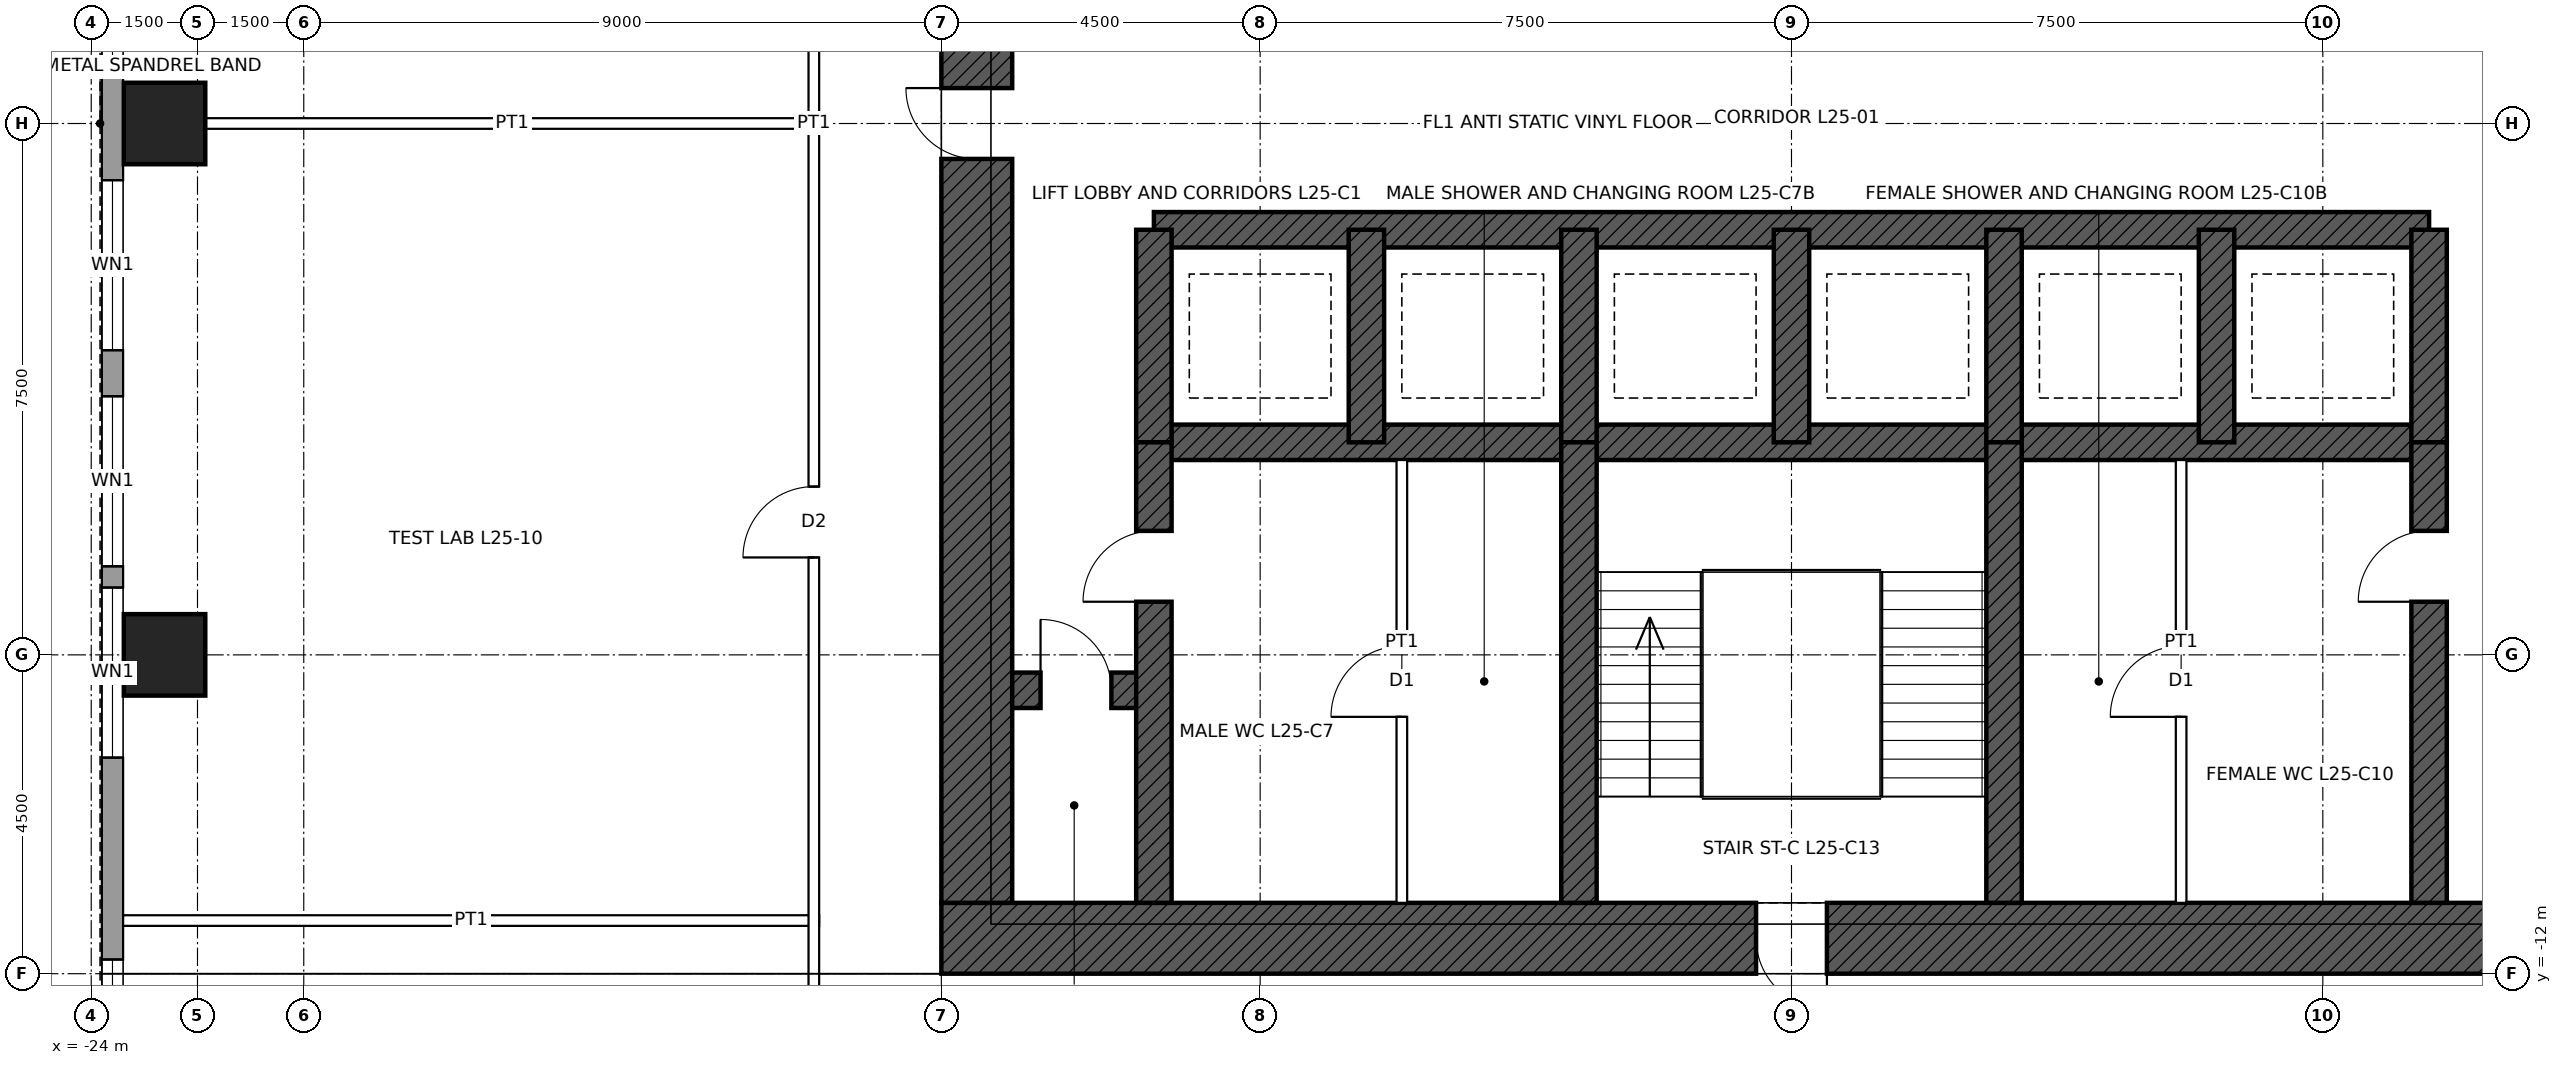
"""IFC4 building model, lengths in metres.
Left out: names, types, materials, properties, quantities, classifications, styles, units other than length and angle.
Written with IfcOpenShell. Run it as: python <this file> out.ifc"""

import sys

from ifc_helpers import new_model, si_unit, direction, frame, frame_2d, origin, origin_2d, place, context, subcontext, project, spatial, rectangle, hollow_rectangle, extrude, element, fill, save


model = new_model("IFC4")
c1 = context("Model", 3, precision=1e-05, world=origin(), true_north=direction((0.0, 1.0)))
c2 = subcontext(c1, "Body", "Model", "MODEL_VIEW")
j1 = project(units=[si_unit("LENGTHUNIT", "METRE"), si_unit("PLANEANGLEUNIT", "RADIAN")], contexts=[c1])
p1 = place(None, origin())
s1 = spatial("IfcSite", under=j1, at=p1, CompositionType="ELEMENT")
p2 = place(p1, origin())
s2 = spatial("IfcBuilding", under=s1, at=p2, CompositionType="ELEMENT")
p3 = place(p2, frame((0.0, 0.0, 126.9)))
s3 = spatial("IfcBuildingStorey", under=s2, at=p3, CompositionType="ELEMENT", Elevation=126.9)
for number, where, z_axis, x_axis in (
    (1, (-22.965, -7.5, 0.0), (0.0, 0.0, 1.0), (1.0, 0.0, 0.0)),
    (2, (-22.965, 0.0, 0.0), (0.0, 0.0, 1.0), (1.0, 0.0, 0.0)),
):
    element("IfcColumn", number, at=place(p3, frame(where, z_axis=z_axis, x_axis=x_axis)), inside=s3, PredefinedType="COLUMN", context=c2, shape_type="SweptSolid", body=[
        extrude(hollow_rectangle(XDim=1.15, YDim=1.15, WallThickness=0.075, at=origin_2d()), origin(), (0.0, 0.0, 1.0), 4.5),
    ])
p4 = place(p3, frame((12.0, -11.5, 0.0), z_axis=(0.0, 0.0, 1.0), x_axis=(-1.0, 0.0, 0.0)))
e3 = element("IfcWall", 3, at=p4, inside=s3, PredefinedType="SHEAR", context=c2, shape_type="SweptSolid", body=[
    extrude(rectangle(XDim=24.0, YDim=1.0, at=frame_2d((12.0, 0.0))), origin(), (0.0, 0.0, 1.0), 4.5),
])
p5 = place(p4, frame((11.5, 0.0, 0.0)))
e4 = element("IfcOpeningElement", 4, at=p5, cuts=e3, PredefinedType="OPENING", context=c2, shape_type="SweptSolid", body=[
    extrude(rectangle(XDim=1.0, YDim=2.1, at=frame_2d((0.5, 1.05))), frame((0.0, 0.51, 0.0), z_axis=(0.0, -1.0, 0.0), x_axis=(1.0, 0.0, 0.0)), (0.0, 0.0, 1.0), 1.02),
])
p6 = place(p4, frame((1.0, 0.0, 0.0)))
e5 = element("IfcOpeningElement", 5, at=p6, cuts=e3, PredefinedType="OPENING", context=c2, shape_type="SweptSolid", body=[
    extrude(rectangle(XDim=1.0, YDim=2.4, at=frame_2d((0.5, 1.2))), frame((0.0, 0.51, 0.0), z_axis=(0.0, -1.0, 0.0), x_axis=(1.0, 0.0, 0.0)), (0.0, 0.0, 1.0), 1.02),
])
p7 = place(p3, frame((-11.5, -11.0, 0.0), z_axis=(0.0, 0.0, 1.0), x_axis=(0.0, 1.0, 0.0)))
e6 = element("IfcWall", 6, at=p7, inside=s3, PredefinedType="SHEAR", context=c2, shape_type="SweptSolid", body=[
    extrude(rectangle(XDim=22.0, YDim=1.0, at=frame_2d((11.0, 0.0))), origin(), (0.0, 0.0, 1.0), 4.5),
])
p8 = place(p7, frame((10.5, 0.0, 0.0)))
e7 = element("IfcOpeningElement", 7, at=p8, cuts=e6, PredefinedType="OPENING", context=c2, shape_type="SweptSolid", body=[
    extrude(rectangle(XDim=1.0, YDim=2.4, at=frame_2d((0.5, 1.2))), frame((0.0, 0.51, 0.0), z_axis=(0.0, -1.0, 0.0), x_axis=(1.0, 0.0, 0.0)), (0.0, 0.0, 1.0), 1.02),
])
for number, where, z_axis, x_axis in (
    (8, (-9.0, -1.5, 0.0), (0.0, 0.0, 1.0), (1.0, 0.0, 0.0)),
    (9, (-9.0, -4.5, 0.0), (0.0, 0.0, 1.0), (1.0, 0.0, 0.0)),
):
    element("IfcWall", number, at=place(p3, frame(where, z_axis=z_axis, x_axis=x_axis)), inside=s3, PredefinedType="SHEAR", context=c2, shape_type="SweptSolid", body=[
        extrude(rectangle(XDim=18.0, YDim=0.5, at=frame_2d((9.0, 0.0))), origin(), (0.0, 0.0, 1.0), 4.5),
    ])
p9 = place(p3, frame((-11.0, -8.0, 0.0), z_axis=(0.0, 0.0, 1.0), x_axis=(1.0, 0.0, 0.0)))
e10 = element("IfcWall", 10, at=p9, inside=s3, PredefinedType="SHEAR", context=c2, shape_type="SweptSolid", body=[
    extrude(rectangle(XDim=2.0, YDim=0.5, at=frame_2d((1.0, 0.0))), origin(), (0.0, 0.0, 1.0), 4.5),
])
p10 = place(p9, frame((0.4, 0.0, 0.0)))
e11 = element("IfcOpeningElement", 11, at=p10, cuts=e10, PredefinedType="OPENING", context=c2, shape_type="SweptSolid", body=[
    extrude(rectangle(XDim=1.0, YDim=2.1, at=frame_2d((0.5, 1.05))), frame((0.0, 0.26, 0.0), z_axis=(0.0, -1.0, 0.0), x_axis=(1.0, 0.0, 0.0)), (0.0, 0.0, 1.0), 0.52),
])
for number, where, z_axis, x_axis in (
    (12, (-9.0, -4.5, 0.0), (0.0, 0.0, 1.0), (0.0, 1.0, 0.0)),
    (13, (9.0, -4.5, 0.0), (0.0, 0.0, 1.0), (0.0, 1.0, 0.0)),
    (14, (-6.0, -4.5, 0.0), (0.0, 0.0, 1.0), (0.0, 1.0, 0.0)),
    (15, (-3.0, -4.5, 0.0), (0.0, 0.0, 1.0), (0.0, 1.0, 0.0)),
    (16, (0.0, -4.5, 0.0), (0.0, 0.0, 1.0), (0.0, 1.0, 0.0)),
    (17, (3.0, -4.5, 0.0), (0.0, 0.0, 1.0), (0.0, 1.0, 0.0)),
    (18, (6.0, -4.5, 0.0), (0.0, 0.0, 1.0), (0.0, 1.0, 0.0)),
):
    element("IfcWall", number, at=place(p3, frame(where, z_axis=z_axis, x_axis=x_axis)), inside=s3, PredefinedType="SHEAR", context=c2, shape_type="SweptSolid", body=[
        extrude(rectangle(XDim=3.0, YDim=0.5, at=frame_2d((1.5, 0.0))), origin(), (0.0, 0.0, 1.0), 4.5),
    ])
p11 = place(p3, frame((-9.0, -11.0, 0.0), z_axis=(0.0, 0.0, 1.0), x_axis=(0.0, 1.0, 0.0)))
e19 = element("IfcWall", 19, at=p11, inside=s3, PredefinedType="SHEAR", context=c2, shape_type="SweptSolid", body=[
    extrude(rectangle(XDim=6.5, YDim=0.5, at=frame_2d((3.25, 0.0))), origin(), (0.0, 0.0, 1.0), 4.5),
])
p12 = place(p11, frame((4.25, 0.0, 0.0)))
e20 = element("IfcOpeningElement", 20, at=p12, cuts=e19, PredefinedType="OPENING", context=c2, shape_type="SweptSolid", body=[
    extrude(rectangle(XDim=1.0, YDim=2.1, at=frame_2d((0.5, 1.05))), frame((0.0, 0.26, 0.0), z_axis=(0.0, -1.0, 0.0), x_axis=(1.0, 0.0, 0.0)), (0.0, 0.0, 1.0), 0.52),
])
p13 = place(p3, frame((9.0, -11.0, 0.0), z_axis=(0.0, 0.0, 1.0), x_axis=(0.0, 1.0, 0.0)))
e21 = element("IfcWall", 21, at=p13, inside=s3, PredefinedType="SHEAR", context=c2, shape_type="SweptSolid", body=[
    extrude(rectangle(XDim=6.5, YDim=0.5, at=frame_2d((3.25, 0.0))), origin(), (0.0, 0.0, 1.0), 4.5),
])
p14 = place(p13, frame((4.25, 0.0, 0.0)))
e22 = element("IfcOpeningElement", 22, at=p14, cuts=e21, PredefinedType="OPENING", context=c2, shape_type="SweptSolid", body=[
    extrude(rectangle(XDim=1.0, YDim=2.1, at=frame_2d((0.5, 1.05))), frame((0.0, 0.26, 0.0), z_axis=(0.0, -1.0, 0.0), x_axis=(1.0, 0.0, 0.0)), (0.0, 0.0, 1.0), 0.52),
])
for number, where, z_axis, x_axis in (
    (23, (-3.0, -11.0, 0.0), (0.0, 0.0, 1.0), (0.0, 1.0, 0.0)),
    (24, (3.0, -11.0, 0.0), (0.0, 0.0, 1.0), (0.0, 1.0, 0.0)),
):
    element("IfcWall", number, at=place(p3, frame(where, z_axis=z_axis, x_axis=x_axis)), inside=s3, PredefinedType="SHEAR", context=c2, shape_type="SweptSolid", body=[
        extrude(rectangle(XDim=6.5, YDim=0.5, at=frame_2d((3.25, 0.0))), origin(), (0.0, 0.0, 1.0), 4.5),
    ])
p15 = place(p3, frame((-23.7, -16.2, 0.0), z_axis=(0.0, 0.0, 1.0), x_axis=(0.0, 1.0, 0.0)))
e25 = element("IfcWall", 25, at=p15, inside=s3, PredefinedType="SOLIDWALL", context=c2, shape_type="SweptSolid", body=[
    extrude(rectangle(XDim=32.4, YDim=0.3, at=frame_2d((16.2, 0.0))), origin(), (0.0, 0.0, 1.0), 4.3),
])
p16 = place(p15, frame((2.0, 0.0, 1.0)))
e26 = element("IfcOpeningElement", 26, at=p16, cuts=e25, PredefinedType="OPENING", context=c2, shape_type="SweptSolid", body=[
    extrude(rectangle(XDim=2.4, YDim=1.2, at=frame_2d((1.2, 0.6))), frame((0.0, 0.16, 0.0), z_axis=(0.0, -1.0, 0.0), x_axis=(1.0, 0.0, 0.0)), (0.0, 0.0, 1.0), 0.32),
])
p17 = place(p15, frame((7.25, 0.0, 1.0)))
e27 = element("IfcOpeningElement", 27, at=p17, cuts=e25, PredefinedType="OPENING", context=c2, shape_type="SweptSolid", body=[
    extrude(rectangle(XDim=2.4, YDim=1.2, at=frame_2d((1.2, 0.6))), frame((0.0, 0.16, 0.0), z_axis=(0.0, -1.0, 0.0), x_axis=(1.0, 0.0, 0.0)), (0.0, 0.0, 1.0), 0.32),
])
p18 = place(p15, frame((9.95, 0.0, 1.0)))
e28 = element("IfcOpeningElement", 28, at=p18, cuts=e25, PredefinedType="OPENING", context=c2, shape_type="SweptSolid", body=[
    extrude(rectangle(XDim=2.4, YDim=1.2, at=frame_2d((1.2, 0.6))), frame((0.0, 0.16, 0.0), z_axis=(0.0, -1.0, 0.0), x_axis=(1.0, 0.0, 0.0)), (0.0, 0.0, 1.0), 0.32),
])
p19 = place(p15, frame((13.0, 0.0, 1.0)))
e29 = element("IfcOpeningElement", 29, at=p19, cuts=e25, PredefinedType="OPENING", context=c2, shape_type="SweptSolid", body=[
    extrude(rectangle(XDim=2.4, YDim=1.2, at=frame_2d((1.2, 0.6))), frame((0.0, 0.16, 0.0), z_axis=(0.0, -1.0, 0.0), x_axis=(1.0, 0.0, 0.0)), (0.0, 0.0, 1.0), 0.32),
])
p20 = place(p15, frame((17.0, 0.0, 1.0)))
e30 = element("IfcOpeningElement", 30, at=p20, cuts=e25, PredefinedType="OPENING", context=c2, shape_type="SweptSolid", body=[
    extrude(rectangle(XDim=2.4, YDim=1.2, at=frame_2d((1.2, 0.6))), frame((0.0, 0.16, 0.0), z_axis=(0.0, -1.0, 0.0), x_axis=(1.0, 0.0, 0.0)), (0.0, 0.0, 1.0), 0.32),
])
p21 = place(p15, frame((20.05, 0.0, 1.0)))
e31 = element("IfcOpeningElement", 31, at=p21, cuts=e25, PredefinedType="OPENING", context=c2, shape_type="SweptSolid", body=[
    extrude(rectangle(XDim=2.4, YDim=1.2, at=frame_2d((1.2, 0.6))), frame((0.0, 0.16, 0.0), z_axis=(0.0, -1.0, 0.0), x_axis=(1.0, 0.0, 0.0)), (0.0, 0.0, 1.0), 0.32),
])
p22 = place(p15, frame((22.75, 0.0, 1.0)))
e32 = element("IfcOpeningElement", 32, at=p22, cuts=e25, PredefinedType="OPENING", context=c2, shape_type="SweptSolid", body=[
    extrude(rectangle(XDim=2.4, YDim=1.2, at=frame_2d((1.2, 0.6))), frame((0.0, 0.16, 0.0), z_axis=(0.0, -1.0, 0.0), x_axis=(1.0, 0.0, 0.0)), (0.0, 0.0, 1.0), 0.32),
])
p23 = place(p15, frame((28.0, 0.0, 1.0)))
e33 = element("IfcOpeningElement", 33, at=p23, cuts=e25, PredefinedType="OPENING", context=c2, shape_type="SweptSolid", body=[
    extrude(rectangle(XDim=2.4, YDim=1.2, at=frame_2d((1.2, 0.6))), frame((0.0, 0.16, 0.0), z_axis=(0.0, -1.0, 0.0), x_axis=(1.0, 0.0, 0.0)), (0.0, 0.0, 1.0), 0.32),
])
p24 = place(p3, frame((-23.55, -11.25, 0.0), z_axis=(0.0, 0.0, 1.0), x_axis=(1.0, 0.0, 0.0)))
e34 = element("IfcWall", 34, at=p24, inside=s3, PredefinedType="PARTITIONING", context=c2, shape_type="SweptSolid", body=[
    extrude(rectangle(XDim=9.825, YDim=0.15, at=frame_2d((4.913, 0.0))), origin(), (0.0, 0.0, 1.0), 3.431),
])
p25 = place(p3, frame((-22.39, 0.0, 0.0), z_axis=(0.0, 0.0, 1.0), x_axis=(1.0, 0.0, 0.0)))
e35 = element("IfcWall", 35, at=p25, inside=s3, PredefinedType="PARTITIONING", context=c2, shape_type="SweptSolid", body=[
    extrude(rectangle(XDim=8.665, YDim=0.15, at=frame_2d((4.333, 0.0))), origin(), (0.0, 0.0, 1.0), 3.431),
])
p26 = place(p3, frame((-13.8, -13.875, 0.0), z_axis=(0.0, 0.0, 1.0), x_axis=(0.0, 1.0, 0.0)))
e36 = element("IfcWall", 36, at=p26, inside=s3, PredefinedType="PARTITIONING", context=c2, shape_type="SweptSolid", body=[
    extrude(rectangle(XDim=27.75, YDim=0.15, at=frame_2d((13.875, 0.0))), origin(), (0.0, 0.0, 1.0), 4.3),
])
p27 = place(p26, frame((7.75, 0.0, 0.0)))
e37 = element("IfcOpeningElement", 37, at=p27, cuts=e36, PredefinedType="OPENING", context=c2, shape_type="SweptSolid", body=[
    extrude(rectangle(XDim=1.0, YDim=2.1, at=frame_2d((0.5, 1.05))), frame((0.0, 0.085, 0.0), z_axis=(0.0, -1.0, 0.0), x_axis=(1.0, 0.0, 0.0)), (0.0, 0.0, 1.0), 0.17),
])
p28 = place(p26, frame((18.6, 0.0, 0.0)))
e38 = element("IfcOpeningElement", 38, at=p28, cuts=e36, PredefinedType="OPENING", context=c2, shape_type="SweptSolid", body=[
    extrude(rectangle(XDim=1.8, YDim=2.4, at=frame_2d((0.9, 1.2))), frame((0.0, 0.085, 0.0), z_axis=(0.0, -1.0, 0.0), x_axis=(1.0, 0.0, 0.0)), (0.0, 0.0, 1.0), 0.17),
])
p29 = place(p3, frame((-5.5, -11.0, 0.0), z_axis=(0.0, 0.0, 1.0), x_axis=(0.0, 1.0, 0.0)))
e39 = element("IfcWall", 39, at=p29, inside=s3, PredefinedType="PARTITIONING", context=c2, shape_type="SweptSolid", body=[
    extrude(rectangle(XDim=6.25, YDim=0.15, at=frame_2d((3.125, 0.0))), origin(), (0.0, 0.0, 1.0), 4.25),
])
p30 = place(p29, frame((2.625, 0.0, 0.0)))
e40 = element("IfcOpeningElement", 40, at=p30, cuts=e39, PredefinedType="OPENING", context=c2, shape_type="SweptSolid", body=[
    extrude(rectangle(XDim=1.0, YDim=2.1, at=frame_2d((0.5, 1.05))), frame((0.0, 0.085, 0.0), z_axis=(0.0, -1.0, 0.0), x_axis=(1.0, 0.0, 0.0)), (0.0, 0.0, 1.0), 0.17),
])
p31 = place(p3, frame((5.5, -11.0, 0.0), z_axis=(0.0, 0.0, 1.0), x_axis=(0.0, 1.0, 0.0)))
e41 = element("IfcWall", 41, at=p31, inside=s3, PredefinedType="PARTITIONING", context=c2, shape_type="SweptSolid", body=[
    extrude(rectangle(XDim=6.25, YDim=0.15, at=frame_2d((3.125, 0.0))), origin(), (0.0, 0.0, 1.0), 4.25),
])
p32 = place(p31, frame((2.625, 0.0, 0.0)))
e42 = element("IfcOpeningElement", 42, at=p32, cuts=e41, PredefinedType="OPENING", context=c2, shape_type="SweptSolid", body=[
    extrude(rectangle(XDim=1.0, YDim=2.1, at=frame_2d((0.5, 1.05))), frame((0.0, 0.085, 0.0), z_axis=(0.0, -1.0, 0.0), x_axis=(1.0, 0.0, 0.0)), (0.0, 0.0, 1.0), 0.17),
])
p33 = place(p16, origin())
e43 = element("IfcWindow", 43, at=p33, inside=s3, PartitioningType="SINGLE_PANEL", PredefinedType="WINDOW", context=c2, shape_type="SweptSolid", body=[
    extrude(rectangle(XDim=2.4, YDim=1.2, at=frame_2d((1.2, 0.6))), frame((0.0, 0.03, 0.0), z_axis=(0.0, -1.0, 0.0), x_axis=(1.0, 0.0, 0.0)), (0.0, 0.0, 1.0), 0.06),
])
fill(e26, e43)
p34 = place(p17, origin())
e44 = element("IfcWindow", 44, at=p34, inside=s3, PartitioningType="SINGLE_PANEL", PredefinedType="WINDOW", context=c2, shape_type="SweptSolid", body=[
    extrude(rectangle(XDim=2.4, YDim=1.2, at=frame_2d((1.2, 0.6))), frame((0.0, 0.03, 0.0), z_axis=(0.0, -1.0, 0.0), x_axis=(1.0, 0.0, 0.0)), (0.0, 0.0, 1.0), 0.06),
])
fill(e27, e44)
p35 = place(p18, origin())
e45 = element("IfcWindow", 45, at=p35, inside=s3, PartitioningType="SINGLE_PANEL", PredefinedType="WINDOW", context=c2, shape_type="SweptSolid", body=[
    extrude(rectangle(XDim=2.4, YDim=1.2, at=frame_2d((1.2, 0.6))), frame((0.0, 0.03, 0.0), z_axis=(0.0, -1.0, 0.0), x_axis=(1.0, 0.0, 0.0)), (0.0, 0.0, 1.0), 0.06),
])
fill(e28, e45)
p36 = place(p19, origin())
e46 = element("IfcWindow", 46, at=p36, inside=s3, PartitioningType="SINGLE_PANEL", PredefinedType="WINDOW", context=c2, shape_type="SweptSolid", body=[
    extrude(rectangle(XDim=2.4, YDim=1.2, at=frame_2d((1.2, 0.6))), frame((0.0, 0.03, 0.0), z_axis=(0.0, -1.0, 0.0), x_axis=(1.0, 0.0, 0.0)), (0.0, 0.0, 1.0), 0.06),
])
fill(e29, e46)
p37 = place(p20, origin())
e47 = element("IfcWindow", 47, at=p37, inside=s3, PartitioningType="SINGLE_PANEL", PredefinedType="WINDOW", context=c2, shape_type="SweptSolid", body=[
    extrude(rectangle(XDim=2.4, YDim=1.2, at=frame_2d((1.2, 0.6))), frame((0.0, 0.03, 0.0), z_axis=(0.0, -1.0, 0.0), x_axis=(1.0, 0.0, 0.0)), (0.0, 0.0, 1.0), 0.06),
])
fill(e30, e47)
p38 = place(p5, origin())
e48 = element("IfcDoor", 48, at=p38, inside=s3, OperationType="SINGLE_SWING_LEFT", PredefinedType="DOOR", context=c2, shape_type="SweptSolid", body=[
    extrude(rectangle(XDim=1.0, YDim=2.1, at=frame_2d((0.5, 1.05))), frame((0.0, 0.485, 0.0), z_axis=(0.0, -1.0, 0.0), x_axis=(1.0, 0.0, 0.0)), (0.0, 0.0, 1.0), 0.05),
])
fill(e4, e48)
p39 = place(p8, origin())
e49 = element("IfcDoor", 49, at=p39, inside=s3, OperationType="SINGLE_SWING_RIGHT", PredefinedType="DOOR", context=c2, shape_type="SweptSolid", body=[
    extrude(rectangle(XDim=1.0, YDim=2.4, at=frame_2d((0.5, 1.2))), frame((0.0, 0.485, 0.0), z_axis=(0.0, -1.0, 0.0), x_axis=(1.0, 0.0, 0.0)), (0.0, 0.0, 1.0), 0.05),
])
fill(e7, e49)
p40 = place(p12, origin())
e50 = element("IfcDoor", 50, at=p40, inside=s3, OperationType="SINGLE_SWING_LEFT", PredefinedType="DOOR", context=c2, shape_type="SweptSolid", body=[
    extrude(rectangle(XDim=1.0, YDim=2.1, at=frame_2d((0.5, 1.05))), frame((0.0, 0.025, 0.0), z_axis=(0.0, -1.0, 0.0), x_axis=(1.0, 0.0, 0.0)), (0.0, 0.0, 1.0), 0.05),
])
fill(e20, e50)
p41 = place(p14, origin())
e51 = element("IfcDoor", 51, at=p41, inside=s3, OperationType="SINGLE_SWING_LEFT", PredefinedType="DOOR", context=c2, shape_type="SweptSolid", body=[
    extrude(rectangle(XDim=1.0, YDim=2.1, at=frame_2d((0.5, 1.05))), frame((0.0, 0.025, 0.0), z_axis=(0.0, -1.0, 0.0), x_axis=(1.0, 0.0, 0.0)), (0.0, 0.0, 1.0), 0.05),
])
fill(e22, e51)
p42 = place(p10, origin())
e52 = element("IfcDoor", 52, at=p42, inside=s3, OperationType="SINGLE_SWING_LEFT", PredefinedType="DOOR", context=c2, shape_type="SweptSolid", body=[
    extrude(rectangle(XDim=1.0, YDim=2.1, at=frame_2d((0.5, 1.05))), frame((0.0, 0.025, 0.0), z_axis=(0.0, -1.0, 0.0), x_axis=(1.0, 0.0, 0.0)), (0.0, 0.0, 1.0), 0.05),
])
fill(e11, e52)
p43 = place(p30, origin())
e53 = element("IfcDoor", 53, at=p43, inside=s3, OperationType="SINGLE_SWING_LEFT", PredefinedType="DOOR", context=c2, shape_type="SweptSolid", body=[
    extrude(rectangle(XDim=1.0, YDim=2.1, at=frame_2d((0.5, 1.05))), frame((0.0, 0.025, 0.0), z_axis=(0.0, -1.0, 0.0), x_axis=(1.0, 0.0, 0.0)), (0.0, 0.0, 1.0), 0.05),
])
fill(e40, e53)
p44 = place(p32, origin())
e54 = element("IfcDoor", 54, at=p44, inside=s3, OperationType="SINGLE_SWING_LEFT", PredefinedType="DOOR", context=c2, shape_type="SweptSolid", body=[
    extrude(rectangle(XDim=1.0, YDim=2.1, at=frame_2d((0.5, 1.05))), frame((0.0, 0.025, 0.0), z_axis=(0.0, -1.0, 0.0), x_axis=(1.0, 0.0, 0.0)), (0.0, 0.0, 1.0), 0.05),
])
fill(e42, e54)
p45 = place(p27, origin())
e55 = element("IfcDoor", 55, at=p45, inside=s3, OperationType="SINGLE_SWING_LEFT", PredefinedType="DOOR", context=c2, shape_type="SweptSolid", body=[
    extrude(rectangle(XDim=1.0, YDim=2.1, at=frame_2d((0.5, 1.05))), frame((0.0, 0.025, 0.0), z_axis=(0.0, -1.0, 0.0), x_axis=(1.0, 0.0, 0.0)), (0.0, 0.0, 1.0), 0.05),
])
fill(e37, e55)
save(model, sys.argv[1])
